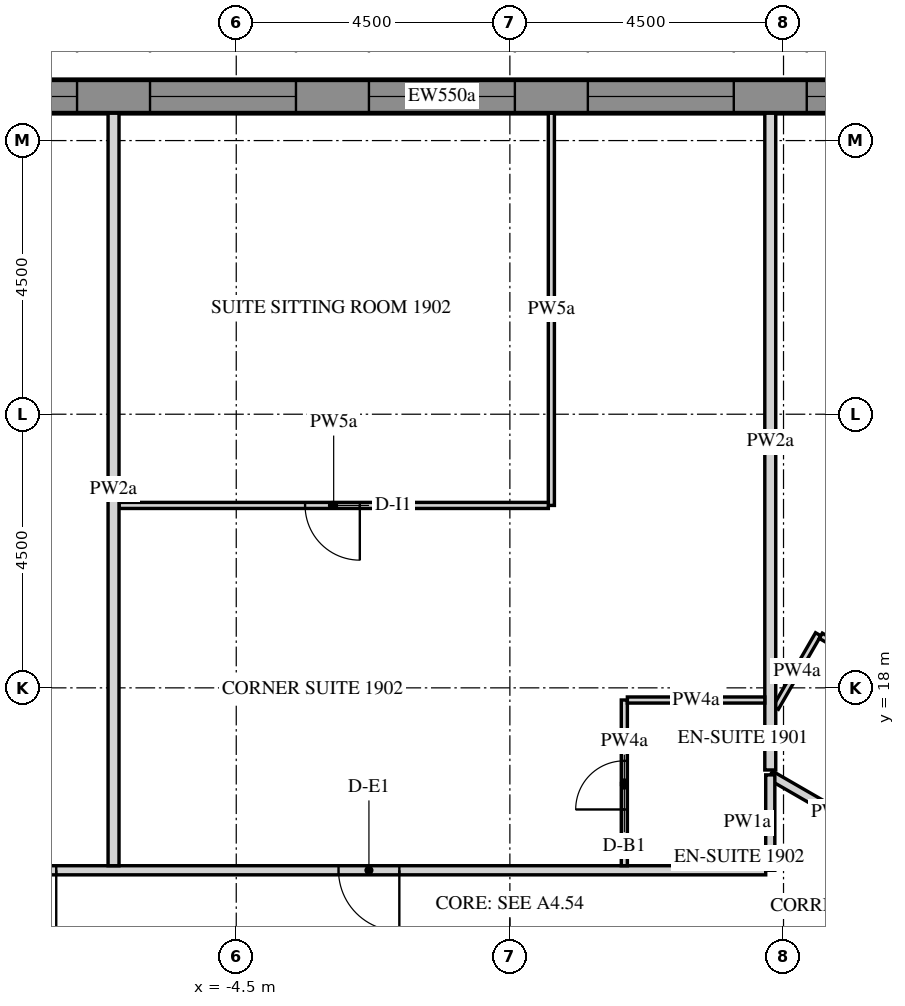
"""IFC4 building model, lengths in metres.
Left out: names, types, materials, properties, quantities, classifications, styles, units other than length and angle.
Written with IfcOpenShell. Run it as: python <this file> out.ifc"""

import sys

from ifc_helpers import new_model, si_unit, direction, frame, frame_2d, origin, place, context, subcontext, project, spatial, polyline, rectangle, outline, extrude, element, fill, save


model = new_model("IFC4")
c1 = context("Model", 3, precision=1e-05, world=origin(), true_north=direction((0.0, 1.0)))
c2 = subcontext(c1, "Body", "Model", "MODEL_VIEW")
j1 = project(units=[si_unit("LENGTHUNIT", "METRE"), si_unit("PLANEANGLEUNIT", "RADIAN")], contexts=[c1])
p1 = place(None, origin())
s1 = spatial("IfcSite", under=j1, at=p1, CompositionType="ELEMENT")
p2 = place(p1, origin())
s2 = spatial("IfcBuilding", under=s1, at=p2, CompositionType="ELEMENT")
p3 = place(p2, frame((0.0, 0.0, 246.3)))
s3 = spatial("IfcBuildingStorey", under=s2, at=p3, CompositionType="ELEMENT", Elevation=246.3)
p4 = place(p3, frame((12.761, 27.725, -0.15), z_axis=(0.0, 0.0, 1.0), x_axis=(-1.0, 0.0, 0.0)))
e1 = element("IfcWall", 1, at=p4, inside=s3, PredefinedType="SOLIDWALL", context=c2, shape_type="SweptSolid", body=[
    extrude(outline(polyline([(-0.022, -0.275), (27.783, -0.275), (27.732, 0.275), (0.022, 0.275), (-0.022, -0.275)])), origin(), (0.0, 0.0, 1.0), 3.75),
])
p5 = place(p4, frame((1.879, 0.0, 1.05)))
e2 = element("IfcOpeningElement", 2, at=p5, cuts=e1, PredefinedType="OPENING", context=c2, shape_type="SweptSolid", body=[
    extrude(rectangle(XDim=2.4, YDim=2.4, at=frame_2d((1.2, 1.2))), frame((0.0, 0.285, 0.0), z_axis=(0.0, -1.0, 0.0), x_axis=(1.0, 0.0, 0.0)), (0.0, 0.0, 1.0), 0.57),
])
p6 = place(p4, frame((5.479, 0.0, 1.05)))
e3 = element("IfcOpeningElement", 3, at=p6, cuts=e1, PredefinedType="OPENING", context=c2, shape_type="SweptSolid", body=[
    extrude(rectangle(XDim=2.4, YDim=2.4, at=frame_2d((1.2, 1.2))), frame((0.0, 0.285, 0.0), z_axis=(0.0, -1.0, 0.0), x_axis=(1.0, 0.0, 0.0)), (0.0, 0.0, 1.0), 0.57),
])
p7 = place(p4, frame((9.079, 0.0, 1.05)))
e4 = element("IfcOpeningElement", 4, at=p7, cuts=e1, PredefinedType="OPENING", context=c2, shape_type="SweptSolid", body=[
    extrude(rectangle(XDim=2.4, YDim=2.4, at=frame_2d((1.2, 1.2))), frame((0.0, 0.285, 0.0), z_axis=(0.0, -1.0, 0.0), x_axis=(1.0, 0.0, 0.0)), (0.0, 0.0, 1.0), 0.57),
])
p8 = place(p4, frame((12.679, 0.0, 1.05)))
e5 = element("IfcOpeningElement", 5, at=p8, cuts=e1, PredefinedType="OPENING", context=c2, shape_type="SweptSolid", body=[
    extrude(rectangle(XDim=2.4, YDim=2.4, at=frame_2d((1.2, 1.2))), frame((0.0, 0.285, 0.0), z_axis=(0.0, -1.0, 0.0), x_axis=(1.0, 0.0, 0.0)), (0.0, 0.0, 1.0), 0.57),
])
p9 = place(p4, frame((16.279, 0.0, 1.05)))
e6 = element("IfcOpeningElement", 6, at=p9, cuts=e1, PredefinedType="OPENING", context=c2, shape_type="SweptSolid", body=[
    extrude(rectangle(XDim=2.4, YDim=2.4, at=frame_2d((1.2, 1.2))), frame((0.0, 0.285, 0.0), z_axis=(0.0, -1.0, 0.0), x_axis=(1.0, 0.0, 0.0)), (0.0, 0.0, 1.0), 0.57),
])
p10 = place(p4, frame((19.879, 0.0, 1.05)))
e7 = element("IfcOpeningElement", 7, at=p10, cuts=e1, PredefinedType="OPENING", context=c2, shape_type="SweptSolid", body=[
    extrude(rectangle(XDim=2.4, YDim=2.4, at=frame_2d((1.2, 1.2))), frame((0.0, 0.285, 0.0), z_axis=(0.0, -1.0, 0.0), x_axis=(1.0, 0.0, 0.0)), (0.0, 0.0, 1.0), 0.57),
])
p11 = place(p4, frame((23.479, 0.0, 1.05)))
e8 = element("IfcOpeningElement", 8, at=p11, cuts=e1, PredefinedType="OPENING", context=c2, shape_type="SweptSolid", body=[
    extrude(rectangle(XDim=2.4, YDim=2.4, at=frame_2d((1.2, 1.2))), frame((0.0, 0.285, 0.0), z_axis=(0.0, -1.0, 0.0), x_axis=(1.0, 0.0, 0.0)), (0.0, 0.0, 1.0), 0.57),
])
p12 = place(p3, frame((6.403, 15.341, 0.0), z_axis=(0.0, 0.0, 1.0), x_axis=(-0.8660013066, 0.500041735226, 0.0)))
e9 = element("IfcWall", 9, at=p12, inside=s3, PredefinedType="PARTITIONING", context=c2, shape_type="SweptSolid", body=[
    extrude(rectangle(XDim=2.449, YDim=0.15, at=frame_2d((1.225, 0.0))), origin(), (0.0, 0.0, 1.0), 2.838),
])
p13 = place(p3, frame((4.207, 15.0, 0.0), z_axis=(0.0, 0.0, 1.0), x_axis=(-1.0, 0.0, 0.0)))
e10 = element("IfcWall", 10, at=p13, inside=s3, PredefinedType="PARTITIONING", context=c2, shape_type="SweptSolid", body=[
    extrude(rectangle(XDim=12.867, YDim=0.15, at=frame_2d((6.434, 0.0))), origin(), (0.0, 0.0, 1.0), 2.838),
])
p14 = place(p13, frame((6.025, 0.0, 0.0)))
e11 = element("IfcOpeningElement", 11, at=p14, cuts=e10, PredefinedType="OPENING", context=c2, shape_type="SweptSolid", body=[
    extrude(rectangle(XDim=1.0, YDim=2.1, at=frame_2d((0.5, 1.05))), frame((0.0, 0.085, 0.0), z_axis=(0.0, -1.0, 0.0), x_axis=(1.0, 0.0, 0.0)), (0.0, 0.0, 1.0), 0.17),
])
p15 = place(p13, frame((11.667, 0.0, 0.0)))
e12 = element("IfcOpeningElement", 12, at=p15, cuts=e10, PredefinedType="OPENING", context=c2, shape_type="SweptSolid", body=[
    extrude(rectangle(XDim=1.0, YDim=2.1, at=frame_2d((0.5, 1.05))), frame((0.0, 0.085, 0.0), z_axis=(0.0, -1.0, 0.0), x_axis=(1.0, 0.0, 0.0)), (0.0, 0.0, 1.0), 0.17),
])
p16 = place(p3, frame((4.282, 16.569, 0.0), z_axis=(0.0, 0.0, 1.0), x_axis=(0.0, -1.0, 0.0)))
e13 = element("IfcWall", 13, at=p16, inside=s3, PredefinedType="PARTITIONING", context=c2, shape_type="SweptSolid", body=[
    extrude(rectangle(XDim=1.569, YDim=0.15, at=frame_2d((0.785, 0.0))), origin(), (0.0, 0.0, 1.0), 2.838),
])
p17 = place(p3, frame((4.372, 17.673, 0.0), z_axis=(0.0, 0.0, 1.0), x_axis=(0.50007068215, 0.86598459158, 0.0)))
e14 = element("IfcWall", 14, at=p17, inside=s3, PredefinedType="PARTITIONING", context=c2, shape_type="SweptSolid", body=[
    extrude(rectangle(XDim=1.396, YDim=0.1, at=frame_2d((0.698, 0.0))), origin(), (0.0, 0.0, 1.0), 2.838),
])
p18 = place(p3, frame((5.113, 18.857, 0.0), z_axis=(0.0, 0.0, 1.0), x_axis=(0.866039941686, -0.499974818771, 0.0)))
e15 = element("IfcWall", 15, at=p18, inside=s3, PredefinedType="PARTITIONING", context=c2, shape_type="SweptSolid", body=[
    extrude(rectangle(XDim=2.875, YDim=0.1, at=frame_2d((1.438, 0.0))), origin(), (0.0, 0.0, 1.0), 2.838),
])
p19 = place(p18, frame((1.05, 0.0, 0.0)))
e16 = element("IfcOpeningElement", 16, at=p19, cuts=e15, PredefinedType="OPENING", context=c2, shape_type="SweptSolid", body=[
    extrude(rectangle(XDim=0.8, YDim=2.1, at=frame_2d((0.4, 1.05))), frame((0.0, 0.06, 0.0), z_axis=(0.0, -1.0, 0.0), x_axis=(1.0, 0.0, 0.0)), (0.0, 0.0, 1.0), 0.12),
])
p20 = place(p3, frame((4.282, 27.45, 0.0), z_axis=(0.0, 0.0, 1.0), x_axis=(0.0, -1.0, 0.0)))
e17 = element("IfcWall", 17, at=p20, inside=s3, PredefinedType="PARTITIONING", context=c2, shape_type="SweptSolid", body=[
    extrude(rectangle(XDim=10.801, YDim=0.18, at=frame_2d((5.4, 0.0))), origin(), (0.0, 0.0, 1.0), 2.838),
])
p21 = place(p3, frame((1.882, 15.075, 0.0), z_axis=(0.0, 0.0, 1.0), x_axis=(0.0, 1.0, 0.0)))
e18 = element("IfcWall", 18, at=p21, inside=s3, PredefinedType="PARTITIONING", context=c2, shape_type="SweptSolid", body=[
    extrude(rectangle(XDim=2.725, YDim=0.1, at=frame_2d((1.363, 0.0))), origin(), (0.0, 0.0, 1.0), 2.838),
])
p22 = place(p21, frame((0.925, 0.0, 0.0)))
e19 = element("IfcOpeningElement", 19, at=p22, cuts=e18, PredefinedType="OPENING", context=c2, shape_type="SweptSolid", body=[
    extrude(rectangle(XDim=0.8, YDim=2.1, at=frame_2d((0.4, 1.05))), frame((0.0, 0.06, 0.0), z_axis=(0.0, -1.0, 0.0), x_axis=(1.0, 0.0, 0.0)), (0.0, 0.0, 1.0), 0.12),
])
p23 = place(p3, frame((1.932, 17.8, 0.0), z_axis=(0.0, 0.0, 1.0), x_axis=(1.0, 0.0, 0.0)))
e20 = element("IfcWall", 20, at=p23, inside=s3, PredefinedType="PARTITIONING", context=c2, shape_type="SweptSolid", body=[
    extrude(rectangle(XDim=2.26, YDim=0.1, at=frame_2d((1.13, 0.0))), origin(), (0.0, 0.0, 1.0), 2.838),
])
p24 = place(p3, frame((0.682, 27.45, 0.0), z_axis=(0.0, 0.0, 1.0), x_axis=(0.0, -1.0, 0.0)))
e21 = element("IfcWall", 21, at=p24, inside=s3, PredefinedType="PARTITIONING", context=c2, shape_type="SweptSolid", body=[
    extrude(rectangle(XDim=6.45, YDim=0.1, at=frame_2d((3.225, 0.0))), origin(), (0.0, 0.0, 1.0), 2.838),
])
p25 = place(p3, frame((0.632, 21.0, 0.0), z_axis=(0.0, 0.0, 1.0), x_axis=(-1.0, 0.0, 0.0)))
e22 = element("IfcWall", 22, at=p25, inside=s3, PredefinedType="PARTITIONING", context=c2, shape_type="SweptSolid", body=[
    extrude(rectangle(XDim=7.06, YDim=0.1, at=frame_2d((3.53, 0.0))), origin(), (0.0, 0.0, 1.0), 2.838),
])
p26 = place(p25, frame((3.1, 0.0, 0.0)))
e23 = element("IfcOpeningElement", 23, at=p26, cuts=e22, PredefinedType="OPENING", context=c2, shape_type="SweptSolid", body=[
    extrude(rectangle(XDim=0.9, YDim=2.1, at=frame_2d((0.45, 1.05))), frame((0.0, 0.06, 0.0), z_axis=(0.0, -1.0, 0.0), x_axis=(1.0, 0.0, 0.0)), (0.0, 0.0, 1.0), 0.12),
])
p27 = place(p3, frame((-6.518, 27.45, 0.0), z_axis=(0.0, 0.0, 1.0), x_axis=(0.0, -1.0, 0.0)))
e24 = element("IfcWall", 24, at=p27, inside=s3, PredefinedType="PARTITIONING", context=c2, shape_type="SweptSolid", body=[
    extrude(rectangle(XDim=12.375, YDim=0.18, at=frame_2d((6.188, 0.0))), origin(), (0.0, 0.0, 1.0), 2.838),
])
p28 = place(p6, frame((0.0, 0.205, 0.0)))
e25 = element("IfcWindow", 25, at=p28, inside=s3, PartitioningType="DOUBLE_PANEL_VERTICAL", PredefinedType="WINDOW", context=c2, shape_type="SweptSolid", body=[
    extrude(rectangle(XDim=2.4, YDim=2.4, at=frame_2d((1.2, 1.2))), frame((0.0, 0.03, 0.0), z_axis=(0.0, -1.0, 0.0), x_axis=(1.0, 0.0, 0.0)), (0.0, 0.0, 1.0), 0.06),
])
fill(e3, e25)
p29 = place(p7, frame((0.0, 0.205, 0.0)))
e26 = element("IfcWindow", 26, at=p29, inside=s3, PartitioningType="DOUBLE_PANEL_VERTICAL", PredefinedType="WINDOW", context=c2, shape_type="SweptSolid", body=[
    extrude(rectangle(XDim=2.4, YDim=2.4, at=frame_2d((1.2, 1.2))), frame((0.0, 0.03, 0.0), z_axis=(0.0, -1.0, 0.0), x_axis=(1.0, 0.0, 0.0)), (0.0, 0.0, 1.0), 0.06),
])
fill(e4, e26)
p30 = place(p8, frame((0.0, 0.205, 0.0)))
e27 = element("IfcWindow", 27, at=p30, inside=s3, PartitioningType="DOUBLE_PANEL_VERTICAL", PredefinedType="WINDOW", context=c2, shape_type="SweptSolid", body=[
    extrude(rectangle(XDim=2.4, YDim=2.4, at=frame_2d((1.2, 1.2))), frame((0.0, 0.03, 0.0), z_axis=(0.0, -1.0, 0.0), x_axis=(1.0, 0.0, 0.0)), (0.0, 0.0, 1.0), 0.06),
])
fill(e5, e27)
p31 = place(p9, frame((0.0, 0.205, 0.0)))
e28 = element("IfcWindow", 28, at=p31, inside=s3, PartitioningType="DOUBLE_PANEL_VERTICAL", PredefinedType="WINDOW", context=c2, shape_type="SweptSolid", body=[
    extrude(rectangle(XDim=2.4, YDim=2.4, at=frame_2d((1.2, 1.2))), frame((0.0, 0.03, 0.0), z_axis=(0.0, -1.0, 0.0), x_axis=(1.0, 0.0, 0.0)), (0.0, 0.0, 1.0), 0.06),
])
fill(e6, e28)
p32 = place(p10, frame((0.0, 0.205, 0.0)))
e29 = element("IfcWindow", 29, at=p32, inside=s3, PartitioningType="DOUBLE_PANEL_VERTICAL", PredefinedType="WINDOW", context=c2, shape_type="SweptSolid", body=[
    extrude(rectangle(XDim=2.4, YDim=2.4, at=frame_2d((1.2, 1.2))), frame((0.0, 0.03, 0.0), z_axis=(0.0, -1.0, 0.0), x_axis=(1.0, 0.0, 0.0)), (0.0, 0.0, 1.0), 0.06),
])
fill(e7, e29)
p33 = place(p14, origin())
e30 = element("IfcDoor", 30, at=p33, inside=s3, OperationType="SINGLE_SWING_RIGHT", PredefinedType="DOOR", context=c2, shape_type="SweptSolid", body=[
    extrude(rectangle(XDim=1.0, YDim=2.1, at=frame_2d((0.5, 1.05))), frame((0.0, 0.025, 0.0), z_axis=(0.0, -1.0, 0.0), x_axis=(1.0, 0.0, 0.0)), (0.0, 0.0, 1.0), 0.05),
])
fill(e11, e30)
p34 = place(p22, origin())
e31 = element("IfcDoor", 31, at=p34, inside=s3, OperationType="SINGLE_SWING_RIGHT", PredefinedType="DOOR", context=c2, shape_type="SweptSolid", body=[
    extrude(rectangle(XDim=0.8, YDim=2.1, at=frame_2d((0.4, 1.05))), frame((0.0, 0.025, 0.0), z_axis=(0.0, -1.0, 0.0), x_axis=(1.0, 0.0, 0.0)), (0.0, 0.0, 1.0), 0.05),
])
fill(e19, e31)
p35 = place(p26, origin())
e32 = element("IfcDoor", 32, at=p35, inside=s3, OperationType="SINGLE_SWING_LEFT", PredefinedType="DOOR", context=c2, shape_type="SweptSolid", body=[
    extrude(rectangle(XDim=0.9, YDim=2.1, at=frame_2d((0.45, 1.05))), frame((0.0, 0.025, 0.0), z_axis=(0.0, -1.0, 0.0), x_axis=(1.0, 0.0, 0.0)), (0.0, 0.0, 1.0), 0.05),
])
fill(e23, e32)
p36 = place(p15, origin())
e33 = element("IfcDoor", 33, at=p36, inside=s3, OperationType="SINGLE_SWING_LEFT", PredefinedType="DOOR", context=c2, shape_type="SweptSolid", body=[
    extrude(rectangle(XDim=1.0, YDim=2.1, at=frame_2d((0.5, 1.05))), frame((0.0, 0.025, 0.0), z_axis=(0.0, -1.0, 0.0), x_axis=(1.0, 0.0, 0.0)), (0.0, 0.0, 1.0), 0.05),
])
fill(e12, e33)
save(model, sys.argv[1])
